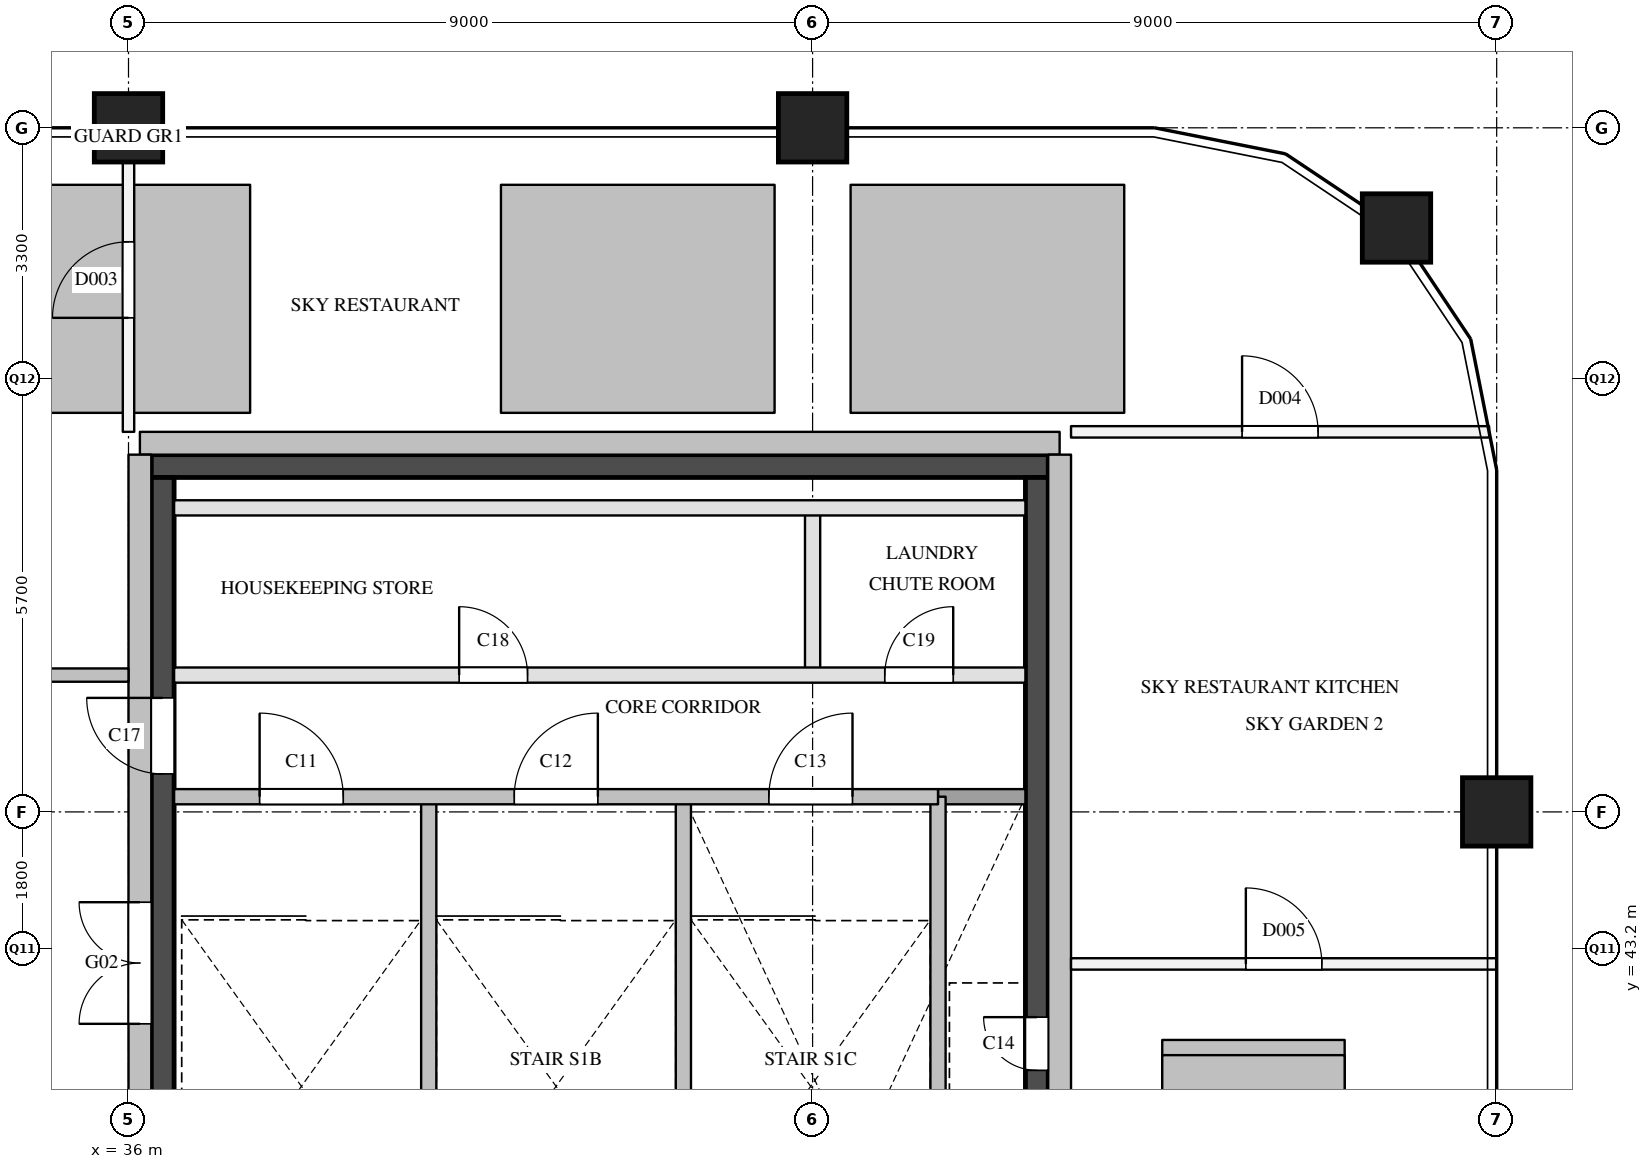
"""IFC4 building model, lengths in metres.
Left out: names, types, materials, properties, quantities, classifications, styles, units other than length and angle.
Written with IfcOpenShell. Run it as: python <this file> out.ifc"""

import sys

from ifc_helpers import new_model, si_unit, direction, frame, frame_2d, origin, origin_2d, place, context, subcontext, project, spatial, rectangle, extrude, element, fill, save


model = new_model("IFC4")
c1 = context("Model", 3, precision=1e-05, world=origin(), true_north=direction((0.0, 1.0)))
c2 = subcontext(c1, "Body", "Model", "MODEL_VIEW")
j1 = project(units=[si_unit("LENGTHUNIT", "METRE"), si_unit("PLANEANGLEUNIT", "RADIAN")], contexts=[c1])
p1 = place(None, origin())
s1 = spatial("IfcSite", under=j1, at=p1, CompositionType="ELEMENT")
p2 = place(p1, origin())
s2 = spatial("IfcBuilding", under=s1, at=p2, CompositionType="ELEMENT")
p3 = place(p2, frame((0.0, 0.0, 320.7)))
s3 = spatial("IfcBuildingStorey", under=s2, at=p3, CompositionType="ELEMENT", Elevation=320.7)
for number, where, z_axis, x_axis in (
    (1, (36.0, 54.0, 0.0), (0.0, 0.0, 1.0), (1.0, 0.0, 0.0)),
    (2, (45.0, 54.0, 0.0), (0.0, 0.0, 1.0), (1.0, 0.0, 0.0)),
    (3, (54.0, 45.0, 0.0), (0.0, 0.0, 1.0), (1.0, 0.0, 0.0)),
    (4, (52.682, 52.682, 0.0), (0.0, 0.0, 1.0), (1.0, 0.0, 0.0)),
):
    element("IfcColumn", number, at=place(p3, frame(where, z_axis=z_axis, x_axis=x_axis)), inside=s3, PredefinedType="COLUMN", context=c2, shape_type="SweptSolid", body=[
        extrude(rectangle(XDim=0.9, YDim=0.9, at=origin_2d()), origin(), (0.0, 0.0, 1.0), 4.5),
    ])
p4 = place(p3, frame((49.6, 41.5, 4.5), z_axis=(0.0, 0.0, 1.0), x_axis=(1.0, 0.0, 0.0)))
e5 = element("IfcWall", 5, at=p4, inside=s3, PredefinedType="SOLIDWALL", context=c2, shape_type="SweptSolid", body=[
    extrude(rectangle(XDim=2.4, YDim=1.0, at=frame_2d((1.2, 0.0))), origin(), (0.0, 0.0, 1.0), 1.35),
])
for number, where, z_axis, x_axis in (
    (6, (34.0, 51.75, 5.1), (0.0, 0.0, 1.0), (1.0, 0.0, 0.0)),
    (7, (40.9, 51.75, 5.1), (0.0, 0.0, 1.0), (1.0, 0.0, 0.0)),
    (8, (45.5, 51.75, 5.1), (0.0, 0.0, 1.0), (1.0, 0.0, 0.0)),
):
    element("IfcWall", number, at=place(p3, frame(where, z_axis=z_axis, x_axis=x_axis)), inside=s3, PredefinedType="SOLIDWALL", context=c2, shape_type="SweptSolid", body=[
        extrude(rectangle(XDim=3.6, YDim=3.0, at=frame_2d((1.8, 0.0))), origin(), (0.0, 0.0, 1.0), 2.6),
    ])
p5 = place(p3, frame((36.15, 49.85, 4.5), z_axis=(0.0, 0.0, 1.0), x_axis=(1.0, 0.0, 0.0)))
e9 = element("IfcWall", 9, at=p5, inside=s3, PredefinedType="SOLIDWALL", context=c2, shape_type="SweptSolid", body=[
    extrude(rectangle(XDim=12.1, YDim=0.3, at=frame_2d((6.05, 0.0))), origin(), (0.0, 0.0, 1.0), 3.6),
])
p6 = place(p3, frame((36.15, 28.8, 4.5), z_axis=(0.0, 0.0, 1.0), x_axis=(0.0, 1.0, 0.0)))
e10 = element("IfcWall", 10, at=p6, inside=s3, PredefinedType="SOLIDWALL", context=c2, shape_type="SweptSolid", body=[
    extrude(rectangle(XDim=20.9, YDim=0.3, at=frame_2d((10.45, 0.0))), origin(), (0.0, 0.0, 1.0), 3.6),
])
p7 = place(p6, frame((5.47, 0.0, 0.0)))
e11 = element("IfcOpeningElement", 11, at=p7, cuts=e10, PredefinedType="OPENING", context=c2, shape_type="SweptSolid", body=[
    extrude(rectangle(XDim=1.6, YDim=2.4, at=frame_2d((0.8, 1.2))), frame((0.0, 0.16, 0.0), z_axis=(0.0, -1.0, 0.0), x_axis=(1.0, 0.0, 0.0)), (0.0, 0.0, 1.0), 0.32),
])
p8 = place(p6, frame((13.412, 0.0, 0.0)))
e12 = element("IfcOpeningElement", 12, at=p8, cuts=e10, PredefinedType="OPENING", context=c2, shape_type="SweptSolid", body=[
    extrude(rectangle(XDim=1.6, YDim=2.4, at=frame_2d((0.8, 1.2))), frame((0.0, 0.16, 0.0), z_axis=(0.0, -1.0, 0.0), x_axis=(1.0, 0.0, 0.0)), (0.0, 0.0, 1.0), 0.32),
])
p9 = place(p3, frame((48.25, 28.8, 4.5), z_axis=(0.0, 0.0, 1.0), x_axis=(0.0, 1.0, 0.0)))
e13 = element("IfcWall", 13, at=p9, inside=s3, PredefinedType="SOLIDWALL", context=c2, shape_type="SweptSolid", body=[
    extrude(rectangle(XDim=20.9, YDim=0.3, at=frame_2d((10.45, 0.0))), origin(), (0.0, 0.0, 1.0), 3.6),
])
p10 = place(p9, frame((9.65, 0.0, 0.0)))
e14 = element("IfcOpeningElement", 14, at=p10, cuts=e13, PredefinedType="OPENING", context=c2, shape_type="SweptSolid", body=[
    extrude(rectangle(XDim=1.6, YDim=2.4, at=frame_2d((0.8, 1.2))), frame((0.0, 0.16, 0.0), z_axis=(0.0, -1.0, 0.0), x_axis=(1.0, 0.0, 0.0)), (0.0, 0.0, 1.0), 0.32),
])
p11 = place(p3, frame((49.6, 41.5, 5.85), z_axis=(0.0, 0.0, 1.0), x_axis=(1.0, 0.0, 0.0)))
e15 = element("IfcWall", 15, at=p11, inside=s3, PredefinedType="SOLIDWALL", context=c2, shape_type="SweptSolid", body=[
    extrude(rectangle(XDim=2.4, YDim=0.6, at=frame_2d((1.2, 0.0))), origin(), (0.0, 0.0, 1.0), 0.75),
])
p12 = place(p3, frame((36.3, 49.55, 0.0), z_axis=(0.0, 0.0, 1.0), x_axis=(1.0, 0.0, 0.0)))
e16 = element("IfcWall", 16, at=p12, inside=s3, PredefinedType="SHEAR", context=c2, shape_type="SweptSolid", body=[
    extrude(rectangle(XDim=11.8, YDim=0.3, at=frame_2d((5.9, 0.0))), origin(), (0.0, 0.0, 1.0), 3.95),
])
p13 = place(p3, frame((36.45, 29.1, 0.0), z_axis=(0.0, 0.0, 1.0), x_axis=(0.0, 1.0, 0.0)))
e17 = element("IfcWall", 17, at=p13, inside=s3, PredefinedType="SHEAR", context=c2, shape_type="SweptSolid", body=[
    extrude(rectangle(XDim=20.3, YDim=0.3, at=frame_2d((10.15, 0.0))), origin(), (0.0, 0.0, 1.0), 3.95),
])
p14 = place(p13, frame((3.6, 0.0, 0.0)))
e18 = element("IfcOpeningElement", 18, at=p14, cuts=e17, PredefinedType="OPENING", context=c2, shape_type="SweptSolid", body=[
    extrude(rectangle(XDim=1.8, YDim=2.1, at=frame_2d((0.9, 1.05))), frame((0.0, 0.16, 0.0), z_axis=(0.0, -1.0, 0.0), x_axis=(1.0, 0.0, 0.0)), (0.0, 0.0, 1.0), 0.32),
])
p15 = place(p13, frame((16.4, 0.0, 0.0)))
e19 = element("IfcOpeningElement", 19, at=p15, cuts=e17, PredefinedType="OPENING", context=c2, shape_type="SweptSolid", body=[
    extrude(rectangle(XDim=1.0, YDim=2.1, at=frame_2d((0.5, 1.05))), frame((0.0, 0.16, 0.0), z_axis=(0.0, -1.0, 0.0), x_axis=(1.0, 0.0, 0.0)), (0.0, 0.0, 1.0), 0.32),
])
p16 = place(p3, frame((47.95, 29.1, 0.0), z_axis=(0.0, 0.0, 1.0), x_axis=(0.0, 1.0, 0.0)))
e20 = element("IfcWall", 20, at=p16, inside=s3, PredefinedType="SHEAR", context=c2, shape_type="SweptSolid", body=[
    extrude(rectangle(XDim=20.3, YDim=0.3, at=frame_2d((10.15, 0.0))), origin(), (0.0, 0.0, 1.0), 3.95),
])
p17 = place(p16, frame((12.5, 0.0, 0.0)))
e21 = element("IfcOpeningElement", 21, at=p17, cuts=e20, PredefinedType="OPENING", context=c2, shape_type="SweptSolid", body=[
    extrude(rectangle(XDim=0.7, YDim=2.1, at=frame_2d((0.35, 1.05))), frame((0.0, 0.16, 0.0), z_axis=(0.0, -1.0, 0.0), x_axis=(1.0, 0.0, 0.0)), (0.0, 0.0, 1.0), 0.32),
])
for number, where, z_axis, x_axis in (
    (22, (39.95, 39.0, 0.0), (0.0, 0.0, 1.0), (0.0, 1.0, 0.0)),
    (23, (43.3, 39.0, 0.0), (0.0, 0.0, 1.0), (0.0, 1.0, 0.0)),
):
    element("IfcWall", number, at=place(p3, frame(where, z_axis=z_axis, x_axis=x_axis)), inside=s3, PredefinedType="SOLIDWALL", context=c2, shape_type="SweptSolid", body=[
        extrude(rectangle(XDim=6.2, YDim=0.2, at=frame_2d((3.1, 0.0))), origin(), (0.0, 0.0, 1.0), 3.95),
    ])
p18 = place(p3, frame((45.0, 46.8, 0.0), z_axis=(0.0, 0.0, 1.0), x_axis=(0.0, 1.0, 0.0)))
e24 = element("IfcWall", 24, at=p18, inside=s3, PredefinedType="PARTITIONING", context=c2, shape_type="SweptSolid", body=[
    extrude(rectangle(XDim=2.2, YDim=0.2, at=frame_2d((1.1, 0.0))), origin(), (0.0, 0.0, 1.0), 3.95),
])
p19 = place(p3, frame((46.65, 39.0, 0.0), z_axis=(0.0, 0.0, 1.0), x_axis=(0.0, 1.0, 0.0)))
e25 = element("IfcWall", 25, at=p19, inside=s3, PredefinedType="SOLIDWALL", context=c2, shape_type="SweptSolid", body=[
    extrude(rectangle(XDim=6.2, YDim=0.2, at=frame_2d((3.1, 0.0))), origin(), (0.0, 0.0, 1.0), 3.95),
])
p20 = place(p3, frame((46.65, 45.2, 0.0), z_axis=(0.0, 0.0, 1.0), x_axis=(1.0, 0.0, 0.0)))
e26 = element("IfcWall", 26, at=p20, inside=s3, PredefinedType="SOLIDWALL", context=c2, shape_type="SweptSolid", body=[
    extrude(rectangle(XDim=1.15, YDim=0.2, at=frame_2d((0.575, 0.0))), origin(), (0.0, 0.0, 1.0), 3.95),
])
p21 = place(p3, frame((36.6, 45.2, 0.0), z_axis=(0.0, 0.0, 1.0), x_axis=(1.0, 0.0, 0.0)))
e27 = element("IfcWall", 27, at=p21, inside=s3, PredefinedType="SOLIDWALL", context=c2, shape_type="SweptSolid", body=[
    extrude(rectangle(XDim=10.05, YDim=0.2, at=frame_2d((5.025, 0.0))), origin(), (0.0, 0.0, 1.0), 3.95),
])
p22 = place(p21, frame((1.125, 0.0, 0.0)))
e28 = element("IfcOpeningElement", 28, at=p22, cuts=e27, PredefinedType="OPENING", context=c2, shape_type="SweptSolid", body=[
    extrude(rectangle(XDim=1.1, YDim=2.1, at=frame_2d((0.55, 1.05))), frame((0.0, 0.11, 0.0), z_axis=(0.0, -1.0, 0.0), x_axis=(1.0, 0.0, 0.0)), (0.0, 0.0, 1.0), 0.22),
])
p23 = place(p21, frame((4.475, 0.0, 0.0)))
e29 = element("IfcOpeningElement", 29, at=p23, cuts=e27, PredefinedType="OPENING", context=c2, shape_type="SweptSolid", body=[
    extrude(rectangle(XDim=1.1, YDim=2.1, at=frame_2d((0.55, 1.05))), frame((0.0, 0.11, 0.0), z_axis=(0.0, -1.0, 0.0), x_axis=(1.0, 0.0, 0.0)), (0.0, 0.0, 1.0), 0.22),
])
p24 = place(p21, frame((7.825, 0.0, 0.0)))
e30 = element("IfcOpeningElement", 30, at=p24, cuts=e27, PredefinedType="OPENING", context=c2, shape_type="SweptSolid", body=[
    extrude(rectangle(XDim=1.1, YDim=2.1, at=frame_2d((0.55, 1.05))), frame((0.0, 0.11, 0.0), z_axis=(0.0, -1.0, 0.0), x_axis=(1.0, 0.0, 0.0)), (0.0, 0.0, 1.0), 0.22),
])
p25 = place(p3, frame((36.6, 46.8, 0.0), z_axis=(0.0, 0.0, 1.0), x_axis=(1.0, 0.0, 0.0)))
e31 = element("IfcWall", 31, at=p25, inside=s3, PredefinedType="PARTITIONING", context=c2, shape_type="SweptSolid", body=[
    extrude(rectangle(XDim=11.2, YDim=0.2, at=frame_2d((5.6, 0.0))), origin(), (0.0, 0.0, 1.0), 3.95),
])
p26 = place(p25, frame((3.75, 0.0, 0.0)))
e32 = element("IfcOpeningElement", 32, at=p26, cuts=e31, PredefinedType="OPENING", context=c2, shape_type="SweptSolid", body=[
    extrude(rectangle(XDim=0.9, YDim=2.1, at=frame_2d((0.45, 1.05))), frame((0.0, 0.11, 0.0), z_axis=(0.0, -1.0, 0.0), x_axis=(1.0, 0.0, 0.0)), (0.0, 0.0, 1.0), 0.22),
])
p27 = place(p25, frame((9.35, 0.0, 0.0)))
e33 = element("IfcOpeningElement", 33, at=p27, cuts=e31, PredefinedType="OPENING", context=c2, shape_type="SweptSolid", body=[
    extrude(rectangle(XDim=0.9, YDim=2.1, at=frame_2d((0.45, 1.05))), frame((0.0, 0.11, 0.0), z_axis=(0.0, -1.0, 0.0), x_axis=(1.0, 0.0, 0.0)), (0.0, 0.0, 1.0), 0.22),
])
p28 = place(p3, frame((36.6, 49.0, 0.0), z_axis=(0.0, 0.0, 1.0), x_axis=(1.0, 0.0, 0.0)))
e34 = element("IfcWall", 34, at=p28, inside=s3, PredefinedType="PARTITIONING", context=c2, shape_type="SweptSolid", body=[
    extrude(rectangle(XDim=11.2, YDim=0.2, at=frame_2d((5.6, 0.0))), origin(), (0.0, 0.0, 1.0), 3.95),
])
p29 = place(p3, frame((34.2, 46.8, 0.0), z_axis=(0.0, 0.0, 1.0), x_axis=(1.0, 0.0, 0.0)))
e35 = element("IfcWall", 35, at=p29, inside=s3, PredefinedType="PARTITIONING", context=c2, shape_type="SweptSolid", body=[
    extrude(rectangle(XDim=1.8, YDim=0.175, at=frame_2d((0.9, 0.0))), origin(), (0.0, 0.0, 1.0), 3.95),
])
p30 = place(p3, frame((48.4, 43.0, 0.0), z_axis=(0.0, 0.0, 1.0), x_axis=(1.0, 0.0, 0.0)))
e36 = element("IfcWall", 36, at=p30, inside=s3, PredefinedType="PARTITIONING", context=c2, shape_type="SweptSolid", body=[
    extrude(rectangle(XDim=5.6, YDim=0.15, at=frame_2d((2.8, 0.0))), origin(), (0.0, 0.0, 1.0), 2.95),
])
p31 = place(p30, frame((2.3, 0.0, 0.0)))
e37 = element("IfcOpeningElement", 37, at=p31, cuts=e36, PredefinedType="OPENING", context=c2, shape_type="SweptSolid", body=[
    extrude(rectangle(XDim=1.0, YDim=2.1, at=frame_2d((0.5, 1.05))), frame((0.0, 0.085, 0.0), z_axis=(0.0, -1.0, 0.0), x_axis=(1.0, 0.0, 0.0)), (0.0, 0.0, 1.0), 0.17),
])
p32 = place(p3, frame((48.4, 50.0, 0.0), z_axis=(0.0, 0.0, 1.0), x_axis=(1.0, 0.0, 0.0)))
e38 = element("IfcWall", 38, at=p32, inside=s3, PredefinedType="PARTITIONING", context=c2, shape_type="SweptSolid", body=[
    extrude(rectangle(XDim=5.5, YDim=0.15, at=frame_2d((2.75, 0.0))), origin(), (0.0, 0.0, 1.0), 2.95),
])
p33 = place(p32, frame((2.25, 0.0, 0.0)))
e39 = element("IfcOpeningElement", 39, at=p33, cuts=e38, PredefinedType="OPENING", context=c2, shape_type="SweptSolid", body=[
    extrude(rectangle(XDim=1.0, YDim=2.1, at=frame_2d((0.5, 1.05))), frame((0.0, 0.085, 0.0), z_axis=(0.0, -1.0, 0.0), x_axis=(1.0, 0.0, 0.0)), (0.0, 0.0, 1.0), 0.17),
])
p34 = place(p3, frame((36.0, 50.0, 0.0), z_axis=(0.0, 0.0, 1.0), x_axis=(0.0, 1.0, 0.0)))
e40 = element("IfcWall", 40, at=p34, inside=s3, PredefinedType="PARTITIONING", context=c2, shape_type="SweptSolid", body=[
    extrude(rectangle(XDim=4.0, YDim=0.15, at=frame_2d((2.0, 0.0))), origin(), (0.0, 0.0, 1.0), 3.95),
])
p35 = place(p34, frame((1.5, 0.0, 0.0)))
e41 = element("IfcOpeningElement", 41, at=p35, cuts=e40, PredefinedType="OPENING", context=c2, shape_type="SweptSolid", body=[
    extrude(rectangle(XDim=1.0, YDim=2.1, at=frame_2d((0.5, 1.05))), frame((0.0, 0.085, 0.0), z_axis=(0.0, -1.0, 0.0), x_axis=(1.0, 0.0, 0.0)), (0.0, 0.0, 1.0), 0.17),
])
p36 = place(p8, origin())
e42 = element("IfcDoor", 42, at=p36, inside=s3, OperationType="DOUBLE_DOOR_SINGLE_SWING", PredefinedType="DOOR", context=c2, shape_type="SweptSolid", body=[
    extrude(rectangle(XDim=1.6, YDim=2.4, at=frame_2d((0.8, 1.2))), frame((0.0, 0.025, 0.0), z_axis=(0.0, -1.0, 0.0), x_axis=(1.0, 0.0, 0.0)), (0.0, 0.0, 1.0), 0.05),
])
fill(e12, e42)
p37 = place(p22, origin())
e43 = element("IfcDoor", 43, at=p37, inside=s3, OperationType="SINGLE_SWING_LEFT", PredefinedType="DOOR", context=c2, shape_type="SweptSolid", body=[
    extrude(rectangle(XDim=1.1, YDim=2.1, at=frame_2d((0.55, 1.05))), frame((0.0, 0.025, 0.0), z_axis=(0.0, -1.0, 0.0), x_axis=(1.0, 0.0, 0.0)), (0.0, 0.0, 1.0), 0.05),
])
fill(e28, e43)
p38 = place(p23, origin())
e44 = element("IfcDoor", 44, at=p38, inside=s3, OperationType="SINGLE_SWING_RIGHT", PredefinedType="DOOR", context=c2, shape_type="SweptSolid", body=[
    extrude(rectangle(XDim=1.1, YDim=2.1, at=frame_2d((0.55, 1.05))), frame((0.0, 0.025, 0.0), z_axis=(0.0, -1.0, 0.0), x_axis=(1.0, 0.0, 0.0)), (0.0, 0.0, 1.0), 0.05),
])
fill(e29, e44)
p39 = place(p24, origin())
e45 = element("IfcDoor", 45, at=p39, inside=s3, OperationType="SINGLE_SWING_RIGHT", PredefinedType="DOOR", context=c2, shape_type="SweptSolid", body=[
    extrude(rectangle(XDim=1.1, YDim=2.1, at=frame_2d((0.55, 1.05))), frame((0.0, 0.025, 0.0), z_axis=(0.0, -1.0, 0.0), x_axis=(1.0, 0.0, 0.0)), (0.0, 0.0, 1.0), 0.05),
])
fill(e30, e45)
p40 = place(p17, origin())
e46 = element("IfcDoor", 46, at=p40, inside=s3, OperationType="SINGLE_SWING_RIGHT", PredefinedType="DOOR", context=c2, shape_type="SweptSolid", body=[
    extrude(rectangle(XDim=0.7, YDim=2.1, at=frame_2d((0.35, 1.05))), frame((0.0, 0.025, 0.0), z_axis=(0.0, -1.0, 0.0), x_axis=(1.0, 0.0, 0.0)), (0.0, 0.0, 1.0), 0.05),
])
fill(e21, e46)
p41 = place(p15, origin())
e47 = element("IfcDoor", 47, at=p41, inside=s3, OperationType="SINGLE_SWING_RIGHT", PredefinedType="DOOR", context=c2, shape_type="SweptSolid", body=[
    extrude(rectangle(XDim=1.0, YDim=2.1, at=frame_2d((0.5, 1.05))), frame((0.0, 0.025, 0.0), z_axis=(0.0, -1.0, 0.0), x_axis=(1.0, 0.0, 0.0)), (0.0, 0.0, 1.0), 0.05),
])
fill(e19, e47)
p42 = place(p26, origin())
e48 = element("IfcDoor", 48, at=p42, inside=s3, OperationType="SINGLE_SWING_LEFT", PredefinedType="DOOR", context=c2, shape_type="SweptSolid", body=[
    extrude(rectangle(XDim=0.9, YDim=2.1, at=frame_2d((0.45, 1.05))), frame((0.0, 0.025, 0.0), z_axis=(0.0, -1.0, 0.0), x_axis=(1.0, 0.0, 0.0)), (0.0, 0.0, 1.0), 0.05),
])
fill(e32, e48)
p43 = place(p27, origin())
e49 = element("IfcDoor", 49, at=p43, inside=s3, OperationType="SINGLE_SWING_RIGHT", PredefinedType="DOOR", context=c2, shape_type="SweptSolid", body=[
    extrude(rectangle(XDim=0.9, YDim=2.1, at=frame_2d((0.45, 1.05))), frame((0.0, 0.025, 0.0), z_axis=(0.0, -1.0, 0.0), x_axis=(1.0, 0.0, 0.0)), (0.0, 0.0, 1.0), 0.05),
])
fill(e33, e49)
p44 = place(p35, origin())
e50 = element("IfcDoor", 50, at=p44, inside=s3, OperationType="SINGLE_SWING_LEFT", PredefinedType="DOOR", context=c2, shape_type="SweptSolid", body=[
    extrude(rectangle(XDim=1.0, YDim=2.1, at=frame_2d((0.5, 1.05))), frame((0.0, 0.025, 0.0), z_axis=(0.0, -1.0, 0.0), x_axis=(1.0, 0.0, 0.0)), (0.0, 0.0, 1.0), 0.05),
])
fill(e41, e50)
p45 = place(p33, origin())
e51 = element("IfcDoor", 51, at=p45, inside=s3, OperationType="SINGLE_SWING_LEFT", PredefinedType="DOOR", context=c2, shape_type="SweptSolid", body=[
    extrude(rectangle(XDim=1.0, YDim=2.1, at=frame_2d((0.5, 1.05))), frame((0.0, 0.025, 0.0), z_axis=(0.0, -1.0, 0.0), x_axis=(1.0, 0.0, 0.0)), (0.0, 0.0, 1.0), 0.05),
])
fill(e39, e51)
p46 = place(p31, origin())
e52 = element("IfcDoor", 52, at=p46, inside=s3, OperationType="SINGLE_SWING_LEFT", PredefinedType="DOOR", context=c2, shape_type="SweptSolid", body=[
    extrude(rectangle(XDim=1.0, YDim=2.1, at=frame_2d((0.5, 1.05))), frame((0.0, 0.025, 0.0), z_axis=(0.0, -1.0, 0.0), x_axis=(1.0, 0.0, 0.0)), (0.0, 0.0, 1.0), 0.05),
])
fill(e37, e52)
save(model, sys.argv[1])
